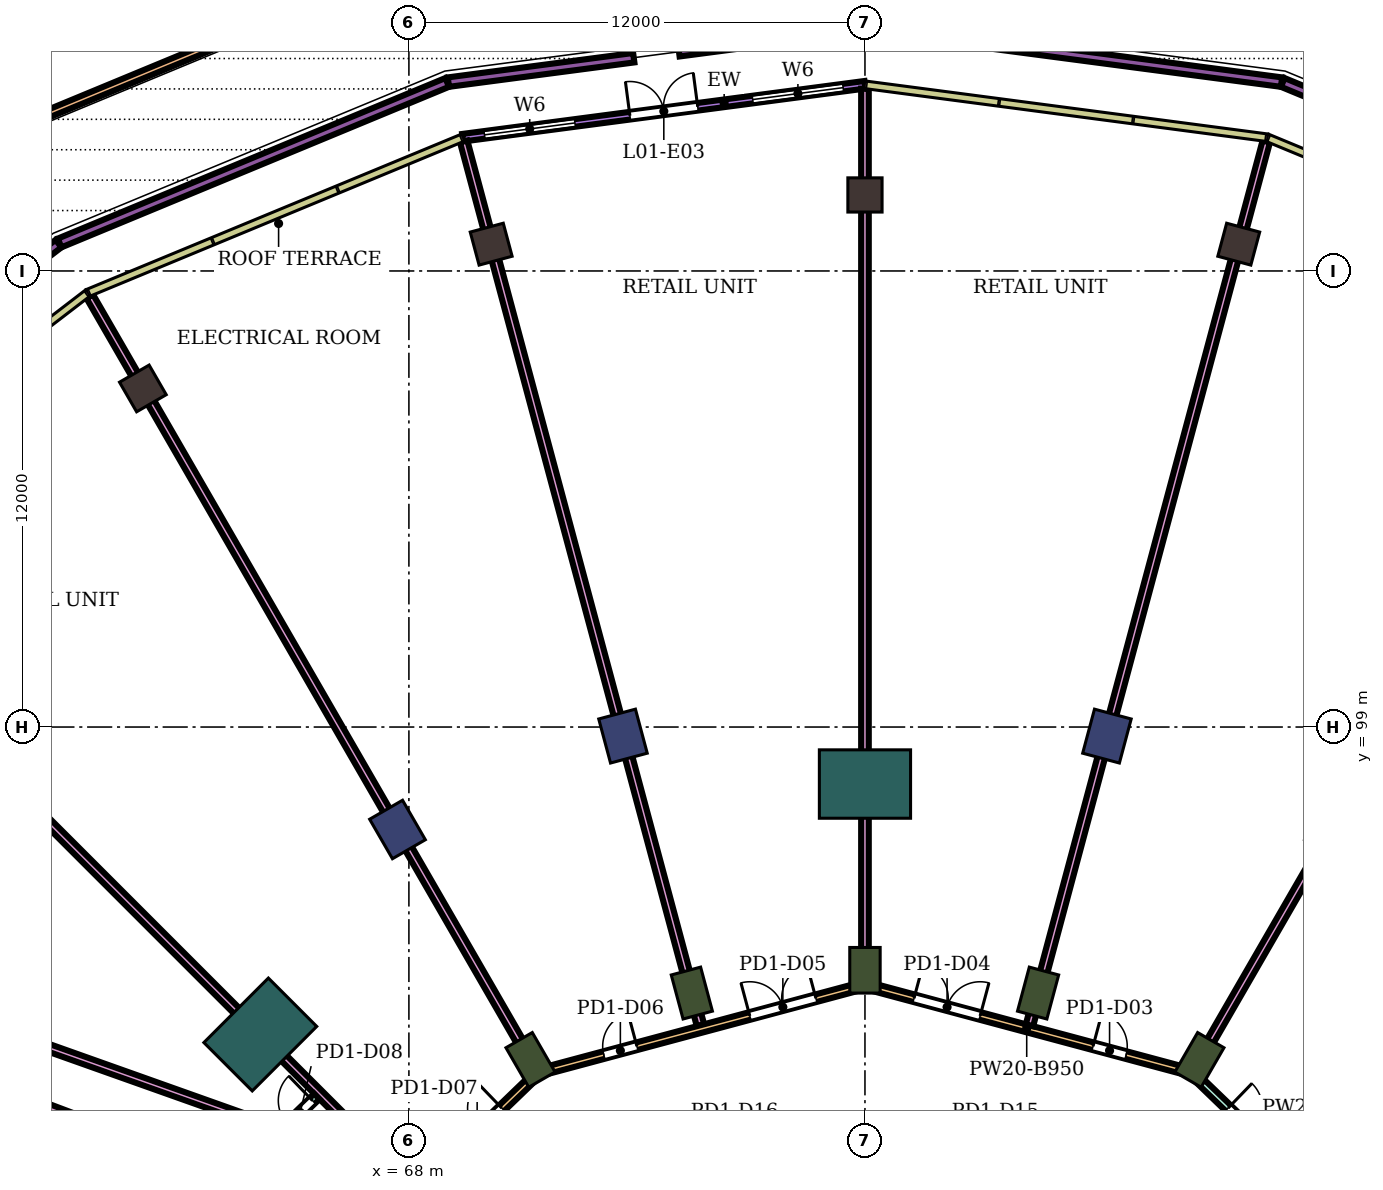
"""IFC4 building model, lengths in metres.
Left out: names, types, materials, properties, quantities, classifications, styles, units other than length and angle.
Written with IfcOpenShell. Run it as: python <this file> out.ifc"""

import sys

from ifc_helpers import new_model, si_unit, direction, frame, frame_2d, origin, origin_2d, place, context, subcontext, project, spatial, rectangle, extrude, element, fill, save


model = new_model("IFC4")
c1 = context("Model", 3, precision=1e-05, world=origin(), true_north=direction((0.0, 1.0)))
c2 = subcontext(c1, "Body", "Model", "MODEL_VIEW")
j1 = project(units=[si_unit("LENGTHUNIT", "METRE"), si_unit("PLANEANGLEUNIT", "RADIAN")], contexts=[c1])
p1 = place(None, origin())
s1 = spatial("IfcSite", under=j1, at=p1, CompositionType="ELEMENT")
p2 = place(p1, origin())
s2 = spatial("IfcBuilding", under=s1, at=p2, CompositionType="ELEMENT")
p3 = place(p2, frame((0.0, 0.0, 7.0)))
s3 = spatial("IfcBuildingStorey", under=s2, at=p3, CompositionType="ELEMENT", Elevation=7.0)
for number, where, z_axis, x_axis in (
    (1, (89.835, 111.705, 0.0), (0.0, 0.0, 1.0), (0.259, 0.966, 0.0)),
    (2, (80.0, 113.0, 0.0), (0.0, 0.0, 1.0), (0.0, 1.0, 0.0)),
    (3, (70.165, 111.705, 0.0), (0.0, 0.0, 1.0), (-0.259, 0.966, 0.0)),
    (4, (61.0, 107.909, 0.0), (0.0, 0.0, 1.0), (-0.5, 0.866, 0.0)),
):
    element("IfcColumn", number, at=place(p3, frame(where, z_axis=z_axis, x_axis=x_axis)), inside=s3, PredefinedType="COLUMN", context=c2, shape_type="SweptSolid", body=[
        extrude(rectangle(XDim=0.9, YDim=0.9, at=origin_2d()), origin(), (0.0, 0.0, 1.0), 5.4),
    ])
for number, where, z_axis, x_axis in (
    (5, (86.367, 98.762, 0.0), (0.0, 0.0, 1.0), (0.259, 0.966, 0.0)),
    (6, (73.633, 98.762, 0.0), (0.0, 0.0, 1.0), (-0.259, 0.966, 0.0)),
    (7, (67.7, 96.304, 0.0), (0.0, 0.0, 1.0), (-0.5, 0.866, 0.0)),
):
    element("IfcColumn", number, at=place(p3, frame(where, z_axis=z_axis, x_axis=x_axis)), inside=s3, PredefinedType="COLUMN", context=c2, shape_type="SweptSolid", body=[
        extrude(rectangle(XDim=1.2, YDim=1.0, at=origin_2d()), origin(), (0.0, 0.0, 1.0), 5.4),
    ])
for number, where, z_axis, x_axis in (
    (8, (88.8, 90.242, 0.0), (0.0, 0.0, 1.0), (0.5, 0.866, 0.0)),
    (9, (84.555, 92.0, 0.0), (0.0, 0.0, 1.0), (0.259, 0.966, 0.0)),
    (10, (80.0, 92.6, 0.0), (0.0, 0.0, 1.0), (0.0, 1.0, 0.0)),
    (11, (75.445, 92.0, 0.0), (0.0, 0.0, 1.0), (-0.259, 0.966, 0.0)),
    (12, (71.2, 90.242, 0.0), (0.0, 0.0, 1.0), (-0.5, 0.866, 0.0)),
):
    element("IfcColumn", number, at=place(p3, frame(where, z_axis=z_axis, x_axis=x_axis)), inside=s3, PredefinedType="COLUMN", context=c2, shape_type="SweptSolid", body=[
        extrude(rectangle(XDim=1.2, YDim=0.8, at=origin_2d()), origin(), (0.0, 0.0, 1.0), 5.4),
    ])
for number, where, z_axis, x_axis in (
    (13, (80.0, 97.5, 0.0), (0.0, 0.0, 1.0), (0.0, 1.0, 0.0)),
    (14, (64.09, 90.91, 0.0), (0.0, 0.0, 1.0), (-0.707, 0.707, 0.0)),
):
    element("IfcColumn", number, at=place(p3, frame(where, z_axis=z_axis, x_axis=x_axis)), inside=s3, PredefinedType="COLUMN", context=c2, shape_type="SweptSolid", body=[
        extrude(rectangle(XDim=1.8, YDim=2.4, at=origin_2d()), origin(), (0.0, 0.0, 1.0), 5.4),
    ])
p4 = place(p3, frame((80.0, 115.899, 0.0), z_axis=(0.0, 0.0, 1.0), x_axis=(-0.991445420614, -0.130521944298, 0.0)))
e15 = element("IfcWall", 15, at=p4, inside=s3, PredefinedType="NOTDEFINED", context=c2, shape_type="SweptSolid", body=[
    extrude(rectangle(XDim=10.677, YDim=0.2, at=frame_2d((5.338, 0.0))), origin(), (0.0, 0.0, 1.0), 5.4),
])
p5 = place(p4, frame((0.58, 0.0, 0.9)))
e16 = element("IfcOpeningElement", 16, at=p5, cuts=e15, PredefinedType="OPENING", context=c2, shape_type="SweptSolid", body=[
    extrude(rectangle(XDim=2.4, YDim=2.4, at=frame_2d((1.2, 1.2))), frame((0.0, 0.11, 0.0), z_axis=(0.0, -1.0, 0.0), x_axis=(1.0, 0.0, 0.0)), (0.0, 0.0, 1.0), 0.22),
])
p6 = place(p4, frame((4.438, 0.0, 0.0)))
e17 = element("IfcOpeningElement", 17, at=p6, cuts=e15, PredefinedType="OPENING", context=c2, shape_type="SweptSolid", body=[
    extrude(rectangle(XDim=1.8, YDim=2.4, at=frame_2d((0.9, 1.2))), frame((0.0, 0.11, 0.0), z_axis=(0.0, -1.0, 0.0), x_axis=(1.0, 0.0, 0.0)), (0.0, 0.0, 1.0), 0.22),
])
p7 = place(p4, frame((7.697, 0.0, 0.9)))
e18 = element("IfcOpeningElement", 18, at=p7, cuts=e15, PredefinedType="OPENING", context=c2, shape_type="SweptSolid", body=[
    extrude(rectangle(XDim=2.4, YDim=2.4, at=frame_2d((1.2, 1.2))), frame((0.0, 0.11, 0.0), z_axis=(0.0, -1.0, 0.0), x_axis=(1.0, 0.0, 0.0)), (0.0, 0.0, 1.0), 0.22),
])
p8 = place(p3, frame((57.164, 114.58, 0.0), z_axis=(0.0, 0.0, 1.0), x_axis=(0.923875337263, 0.382693560434, 0.0)))
e19 = element("IfcWall", 19, at=p8, inside=s3, PredefinedType="PARAPET", context=c2, shape_type="SweptSolid", body=[
    extrude(rectangle(XDim=11.903, YDim=0.2, at=frame_2d((5.951, 0.0))), origin(), (0.0, 0.0, 1.0), 1.1),
])
p9 = place(p3, frame((80.0, 117.412, 0.0), z_axis=(0.0, 0.0, 1.0), x_axis=(0.991443543519, -0.130536201932, 0.0)))
e20 = element("IfcWall", 20, at=p9, inside=s3, PredefinedType="USERDEFINED", context=c2, shape_type="SweptSolid", body=[
    extrude(rectangle(XDim=11.055, YDim=0.25, at=frame_2d((5.528, 0.0))), origin(), (0.0, 0.0, 1.0), 0.6),
])
p10 = place(p3, frame((90.992, 115.961, 0.0), z_axis=(0.0, 0.0, 1.0), x_axis=(0.923882326735, -0.382676686443, 0.0)))
e21 = element("IfcWall", 21, at=p10, inside=s3, PredefinedType="USERDEFINED", context=c2, shape_type="SweptSolid", body=[
    extrude(rectangle(XDim=11.039, YDim=0.25, at=frame_2d((5.52, 0.0))), origin(), (0.0, 0.0, 1.0), 0.6),
])
p11 = place(p3, frame((50.017, 104.995, 0.0), z_axis=(0.0, 0.0, 1.0), x_axis=(0.793356238532, 0.608757651929, 0.0)))
e22 = element("IfcWall", 22, at=p11, inside=s3, PredefinedType="USERDEFINED", context=c2, shape_type="SweptSolid", body=[
    extrude(rectangle(XDim=11.047, YDim=0.25, at=frame_2d((5.524, 0.0))), origin(), (0.0, 0.0, 1.0), 0.6),
])
p12 = place(p3, frame((58.809, 111.736, 0.0), z_axis=(0.0, 0.0, 1.0), x_axis=(0.923882326735, 0.382676686443, 0.0)))
e23 = element("IfcWall", 23, at=p12, inside=s3, PredefinedType="USERDEFINED", context=c2, shape_type="SweptSolid", body=[
    extrude(rectangle(XDim=11.039, YDim=0.25, at=frame_2d((5.52, 0.0))), origin(), (0.0, 0.0, 1.0), 0.6),
])
p13 = place(p3, frame((69.039, 115.969, 0.0), z_axis=(0.0, 0.0, 1.0), x_axis=(0.991445002311, 0.130525121694, 0.0)))
e24 = element("IfcWall", 24, at=p13, inside=s3, PredefinedType="USERDEFINED", context=c2, shape_type="SweptSolid", body=[
    extrude(rectangle(XDim=4.919, YDim=0.25, at=frame_2d((2.459, 0.0))), origin(), (0.0, 0.0, 1.0), 0.6),
])
p14 = place(p3, frame((75.106, 116.768, 0.0), z_axis=(0.0, 0.0, 1.0), x_axis=(0.991443854217, 0.130533842111, 0.0)))
e25 = element("IfcWall", 25, at=p14, inside=s3, PredefinedType="USERDEFINED", context=c2, shape_type="SweptSolid", body=[
    extrude(rectangle(XDim=4.936, YDim=0.25, at=frame_2d((2.468, 0.0))), origin(), (0.0, 0.0, 1.0), 0.6),
])
p15 = place(p3, frame((43.308, 92.114, 0.0), z_axis=(0.0, 0.0, 1.0), x_axis=(0.919685506152, -0.39265579045, 0.0)))
e26 = element("IfcWall", 26, at=p15, inside=s3, PredefinedType="PARTITIONING", context=c2, shape_type="SweptSolid", body=[
    extrude(rectangle(XDim=18.848, YDim=0.2, at=frame_2d((9.424, 0.0))), origin(), (0.0, 0.0, 1.0), 4.95),
])
p16 = place(p3, frame((43.775, 93.243, 0.0), z_axis=(0.0, 0.0, 1.0), x_axis=(0.928161429734, -0.372177861181, 0.0)))
e27 = element("IfcWall", 27, at=p16, inside=s3, PredefinedType="PARTITIONING", context=c2, shape_type="SweptSolid", body=[
    extrude(rectangle(XDim=19.568, YDim=0.2, at=frame_2d((9.784, 0.0))), origin(), (0.0, 0.0, 1.0), 3.35),
])
p17 = place(p3, frame((44.238, 94.363, 0.0), z_axis=(0.0, 0.0, 1.0), x_axis=(0.935745518328, -0.352675948896, 0.0)))
e28 = element("IfcWall", 28, at=p17, inside=s3, PredefinedType="PARTITIONING", context=c2, shape_type="SweptSolid", body=[
    extrude(rectangle(XDim=20.295, YDim=0.2, at=frame_2d((10.147, 0.0))), origin(), (0.0, 0.0, 1.0), 3.35),
])
p18 = place(p3, frame((44.719, 95.463, 0.0), z_axis=(0.0, 0.0, 1.0), x_axis=(0.94231036805, -0.33474045209, 0.0)))
e29 = element("IfcWall", 29, at=p18, inside=s3, PredefinedType="PARTITIONING", context=c2, shape_type="SweptSolid", body=[
    extrude(rectangle(XDim=20.987, YDim=0.2, at=frame_2d((10.493, 0.0))), origin(), (0.0, 0.0, 1.0), 3.35),
])
p19 = place(p3, frame((51.152, 103.848, 0.0), z_axis=(0.0, 0.0, 1.0), x_axis=(0.707106781187, -0.707106781187, 0.0)))
e30 = element("IfcWall", 30, at=p19, inside=s3, PredefinedType="PARTITIONING", context=c2, shape_type="SweptSolid", body=[
    extrude(rectangle(XDim=23.993, YDim=0.2, at=frame_2d((11.997, 0.0))), origin(), (0.0, 0.0, 1.0), 3.35),
])
p20 = place(p3, frame((59.48, 83.4, 0.0), z_axis=(0.0, 0.0, 1.0), x_axis=(0.71978771682, 0.694194239903, 0.0)))
e31 = element("IfcWall", 31, at=p20, inside=s3, PredefinedType="PARTITIONING", context=c2, shape_type="SweptSolid", body=[
    extrude(rectangle(XDim=8.471, YDim=0.2, at=frame_2d((4.235, 0.0))), origin(), (0.0, 0.0, 1.0), 4.95),
])
p21 = place(p20, frame((7.413, 0.0, 0.0)))
e32 = element("IfcOpeningElement", 32, at=p21, cuts=e31, PredefinedType="OPENING", context=c2, shape_type="SweptSolid", body=[
    extrude(rectangle(XDim=0.9, YDim=2.1, at=frame_2d((0.45, 1.05))), frame((0.0, 0.11, 0.0), z_axis=(0.0, -1.0, 0.0), x_axis=(1.0, 0.0, 0.0)), (0.0, 0.0, 1.0), 0.22),
])
p22 = place(p20, frame((5.84, 0.0, 0.0)))
e33 = element("IfcOpeningElement", 33, at=p22, cuts=e31, PredefinedType="OPENING", context=c2, shape_type="SweptSolid", body=[
    extrude(rectangle(XDim=0.9, YDim=2.1, at=frame_2d((0.45, 1.05))), frame((0.0, 0.11, 0.0), z_axis=(0.0, -1.0, 0.0), x_axis=(1.0, 0.0, 0.0)), (0.0, 0.0, 1.0), 0.22),
])
p23 = place(p20, frame((4.055, 0.0, 0.0)))
e34 = element("IfcOpeningElement", 34, at=p23, cuts=e31, PredefinedType="OPENING", context=c2, shape_type="SweptSolid", body=[
    extrude(rectangle(XDim=0.9, YDim=2.1, at=frame_2d((0.45, 1.05))), frame((0.0, 0.11, 0.0), z_axis=(0.0, -1.0, 0.0), x_axis=(1.0, 0.0, 0.0)), (0.0, 0.0, 1.0), 0.22),
])
p24 = place(p20, frame((2.256, 0.0, 0.0)))
e35 = element("IfcOpeningElement", 35, at=p24, cuts=e31, PredefinedType="OPENING", context=c2, shape_type="SweptSolid", body=[
    extrude(rectangle(XDim=0.9, YDim=2.1, at=frame_2d((0.45, 1.05))), frame((0.0, 0.11, 0.0), z_axis=(0.0, -1.0, 0.0), x_axis=(1.0, 0.0, 0.0)), (0.0, 0.0, 1.0), 0.22),
])
p25 = place(p20, frame((0.251, 0.0, 0.0)))
e36 = element("IfcOpeningElement", 36, at=p25, cuts=e31, PredefinedType="OPENING", context=c2, shape_type="SweptSolid", body=[
    extrude(rectangle(XDim=0.9, YDim=2.1, at=frame_2d((0.45, 1.05))), frame((0.0, 0.11, 0.0), z_axis=(0.0, -1.0, 0.0), x_axis=(1.0, 0.0, 0.0)), (0.0, 0.0, 1.0), 0.22),
])
p26 = place(p3, frame((59.601, 110.333, 0.0), z_axis=(0.0, 0.0, 1.0), x_axis=(0.499979991004, -0.866036955676, 0.0)))
e37 = element("IfcWall", 37, at=p26, inside=s3, PredefinedType="PARTITIONING", context=c2, shape_type="SweptSolid", body=[
    extrude(rectangle(XDim=23.497, YDim=0.2, at=frame_2d((11.748, 0.0))), origin(), (0.0, 0.0, 1.0), 3.35),
])
p27 = place(p3, frame((66.22, 84.9, 0.0), z_axis=(0.0, 0.0, 1.0), x_axis=(0.719621348931, 0.694366700068, 0.0)))
e38 = element("IfcWall", 38, at=p27, inside=s3, PredefinedType="PARTITIONING", context=c2, shape_type="SweptSolid", body=[
    extrude(rectangle(XDim=7.173, YDim=0.2, at=frame_2d((3.586, 0.0))), origin(), (0.0, 0.0, 1.0), 4.45),
])
p28 = place(p27, frame((4.069, 0.0, 0.0)))
e39 = element("IfcOpeningElement", 39, at=p28, cuts=e38, PredefinedType="OPENING", context=c2, shape_type="SweptSolid", body=[
    extrude(rectangle(XDim=1.8, YDim=2.1, at=frame_2d((0.9, 1.05))), frame((0.0, 0.11, 0.0), z_axis=(0.0, -1.0, 0.0), x_axis=(1.0, 0.0, 0.0)), (0.0, 0.0, 1.0), 0.22),
])
p29 = place(p27, frame((0.932, 0.0, 0.0)))
e40 = element("IfcOpeningElement", 40, at=p29, cuts=e38, PredefinedType="OPENING", context=c2, shape_type="SweptSolid", body=[
    extrude(rectangle(XDim=0.9, YDim=2.1, at=frame_2d((0.45, 1.05))), frame((0.0, 0.11, 0.0), z_axis=(0.0, -1.0, 0.0), x_axis=(1.0, 0.0, 0.0)), (0.0, 0.0, 1.0), 0.22),
])
p30 = place(p3, frame((69.441, 114.407, 0.0), z_axis=(0.0, 0.0, 1.0), x_axis=(0.25880367254, -0.965929945224, 0.0)))
e41 = element("IfcWall", 41, at=p30, inside=s3, PredefinedType="PARTITIONING", context=c2, shape_type="SweptSolid", body=[
    extrude(rectangle(XDim=24.074, YDim=0.2, at=frame_2d((12.037, 0.0))), origin(), (0.0, 0.0, 1.0), 3.35),
])
p31 = place(p3, frame((71.411, 89.908, 0.0), z_axis=(0.0, 0.0, 1.0), x_axis=(0.965907314361, 0.258888122678, 0.0)))
e42 = element("IfcWall", 42, at=p31, inside=s3, PredefinedType="PARTITIONING", context=c2, shape_type="SweptSolid", body=[
    extrude(rectangle(XDim=8.802, YDim=0.2, at=frame_2d((4.401, 0.0))), origin(), (0.0, 0.0, 1.0), 4.45),
])
p32 = place(p31, frame((5.755, 0.0, 0.0)))
e43 = element("IfcOpeningElement", 43, at=p32, cuts=e42, PredefinedType="OPENING", context=c2, shape_type="SweptSolid", body=[
    extrude(rectangle(XDim=1.8, YDim=2.1, at=frame_2d((0.9, 1.05))), frame((0.0, 0.11, 0.0), z_axis=(0.0, -1.0, 0.0), x_axis=(1.0, 0.0, 0.0)), (0.0, 0.0, 1.0), 0.22),
])
p33 = place(p31, frame((1.779, 0.0, 0.0)))
e44 = element("IfcOpeningElement", 44, at=p33, cuts=e42, PredefinedType="OPENING", context=c2, shape_type="SweptSolid", body=[
    extrude(rectangle(XDim=0.9, YDim=2.1, at=frame_2d((0.45, 1.05))), frame((0.0, 0.11, 0.0), z_axis=(0.0, -1.0, 0.0), x_axis=(1.0, 0.0, 0.0)), (0.0, 0.0, 1.0), 0.22),
])
p34 = place(p3, frame((80.0, 92.3, 0.0), z_axis=(0.0, 0.0, 1.0), x_axis=(0.0, 1.0, 0.0)))
e45 = element("IfcWall", 45, at=p34, inside=s3, PredefinedType="PARTITIONING", context=c2, shape_type="SweptSolid", body=[
    extrude(rectangle(XDim=23.498, YDim=0.2, at=frame_2d((11.749, 0.0))), origin(), (0.0, 0.0, 1.0), 3.35),
])
p35 = place(p3, frame((80.0, 92.21, 0.0), z_axis=(0.0, 0.0, 1.0), x_axis=(0.965910452724, -0.258876413213, 0.0)))
e46 = element("IfcWall", 46, at=p35, inside=s3, PredefinedType="PARTITIONING", context=c2, shape_type="SweptSolid", body=[
    extrude(rectangle(XDim=8.812, YDim=0.2, at=frame_2d((4.406, 0.0))), origin(), (0.0, 0.0, 1.0), 4.45),
])
p36 = place(p35, frame((6.213, 0.0, 0.0)))
e47 = element("IfcOpeningElement", 47, at=p36, cuts=e46, PredefinedType="OPENING", context=c2, shape_type="SweptSolid", body=[
    extrude(rectangle(XDim=0.9, YDim=2.1, at=frame_2d((0.45, 1.05))), frame((0.0, 0.11, 0.0), z_axis=(0.0, -1.0, 0.0), x_axis=(1.0, 0.0, 0.0)), (0.0, 0.0, 1.0), 0.22),
])
p37 = place(p35, frame((1.337, 0.0, 0.0)))
e48 = element("IfcOpeningElement", 48, at=p37, cuts=e46, PredefinedType="OPENING", context=c2, shape_type="SweptSolid", body=[
    extrude(rectangle(XDim=1.8, YDim=2.1, at=frame_2d((0.9, 1.05))), frame((0.0, 0.11, 0.0), z_axis=(0.0, -1.0, 0.0), x_axis=(1.0, 0.0, 0.0)), (0.0, 0.0, 1.0), 0.22),
])
p38 = place(p3, frame((84.329, 91.153, 0.0), z_axis=(0.0, 0.0, 1.0), x_axis=(0.258825131653, 0.965924195382, 0.0)))
e49 = element("IfcWall", 49, at=p38, inside=s3, PredefinedType="PARTITIONING", context=c2, shape_type="SweptSolid", body=[
    extrude(rectangle(XDim=24.074, YDim=0.2, at=frame_2d((12.037, 0.0))), origin(), (0.0, 0.0, 1.0), 3.35),
])
p39 = place(p3, frame((88.668, 89.832, 0.0), z_axis=(0.0, 0.0, 1.0), x_axis=(0.71956091863, -0.694429322811, 0.0)))
e50 = element("IfcWall", 50, at=p39, inside=s3, PredefinedType="PARTITIONING", context=c2, shape_type="SweptSolid", body=[
    extrude(rectangle(XDim=7.043, YDim=0.2, at=frame_2d((3.521, 0.0))), origin(), (0.0, 0.0, 1.0), 4.95),
])
p40 = place(p39, frame((4.821, 0.0, 0.0)))
e51 = element("IfcOpeningElement", 51, at=p40, cuts=e50, PredefinedType="OPENING", context=c2, shape_type="SweptSolid", body=[
    extrude(rectangle(XDim=1.8, YDim=2.1, at=frame_2d((0.9, 1.05))), frame((0.0, 0.11, 0.0), z_axis=(0.0, -1.0, 0.0), x_axis=(1.0, 0.0, 0.0)), (0.0, 0.0, 1.0), 0.22),
])
p41 = place(p39, frame((1.234, 0.0, 0.0)))
e52 = element("IfcOpeningElement", 52, at=p41, cuts=e50, PredefinedType="OPENING", context=c2, shape_type="SweptSolid", body=[
    extrude(rectangle(XDim=1.8, YDim=2.1, at=frame_2d((0.9, 1.05))), frame((0.0, 0.11, 0.0), z_axis=(0.0, -1.0, 0.0), x_axis=(1.0, 0.0, 0.0)), (0.0, 0.0, 1.0), 0.22),
])
p42 = place(p3, frame((88.602, 89.896, 0.0), z_axis=(0.0, 0.0, 1.0), x_axis=(0.500044870432, 0.865999496279, 0.0)))
e53 = element("IfcWall", 53, at=p42, inside=s3, PredefinedType="PARTITIONING", context=c2, shape_type="SweptSolid", body=[
    extrude(rectangle(XDim=23.596, YDim=0.2, at=frame_2d((11.798, 0.0))), origin(), (0.0, 0.0, 1.0), 3.35),
])
p43 = place(p5, origin())
e54 = element("IfcWindow", 54, at=p43, inside=s3, PartitioningType="SINGLE_PANEL", PredefinedType="WINDOW", context=c2, shape_type="SweptSolid", body=[
    extrude(rectangle(XDim=2.4, YDim=2.4, at=frame_2d((1.2, 1.2))), frame((0.0, 0.03, 0.0), z_axis=(0.0, -1.0, 0.0), x_axis=(1.0, 0.0, 0.0)), (0.0, 0.0, 1.0), 0.06),
])
fill(e16, e54)
p44 = place(p6, frame((1.8, 0.0, 0.0), z_axis=(0.0, 0.0, 1.0), x_axis=(-1.0, 0.0, 0.0)))
e55 = element("IfcDoor", 55, at=p44, inside=s3, OperationType="DOUBLE_DOOR_SINGLE_SWING", PredefinedType="DOOR", context=c2, shape_type="SweptSolid", body=[
    extrude(rectangle(XDim=1.8, YDim=2.4, at=frame_2d((0.9, 1.2))), frame((0.0, 0.025, 0.0), z_axis=(0.0, -1.0, 0.0), x_axis=(1.0, 0.0, 0.0)), (0.0, 0.0, 1.0), 0.05),
])
fill(e17, e55)
p45 = place(p7, origin())
e56 = element("IfcWindow", 56, at=p45, inside=s3, PartitioningType="SINGLE_PANEL", PredefinedType="WINDOW", context=c2, shape_type="SweptSolid", body=[
    extrude(rectangle(XDim=2.4, YDim=2.4, at=frame_2d((1.2, 1.2))), frame((0.0, 0.03, 0.0), z_axis=(0.0, -1.0, 0.0), x_axis=(1.0, 0.0, 0.0)), (0.0, 0.0, 1.0), 0.06),
])
fill(e18, e56)
p46 = place(p41, origin())
e57 = element("IfcDoor", 57, at=p46, inside=s3, OperationType="DOUBLE_DOOR_SINGLE_SWING", PredefinedType="DOOR", context=c2, shape_type="SweptSolid", body=[
    extrude(rectangle(XDim=1.8, YDim=2.1, at=frame_2d((0.9, 1.05))), frame((0.0, 0.025, 0.0), z_axis=(0.0, -1.0, 0.0), x_axis=(1.0, 0.0, 0.0)), (0.0, 0.0, 1.0), 0.05),
])
fill(e52, e57)
p47 = place(p36, origin())
e58 = element("IfcDoor", 58, at=p47, inside=s3, OperationType="SINGLE_SWING_LEFT", PredefinedType="DOOR", context=c2, shape_type="SweptSolid", body=[
    extrude(rectangle(XDim=0.9, YDim=2.1, at=frame_2d((0.45, 1.05))), frame((0.0, 0.025, 0.0), z_axis=(0.0, -1.0, 0.0), x_axis=(1.0, 0.0, 0.0)), (0.0, 0.0, 1.0), 0.05),
])
fill(e47, e58)
p48 = place(p37, origin())
e59 = element("IfcDoor", 59, at=p48, inside=s3, OperationType="DOUBLE_DOOR_SINGLE_SWING", PredefinedType="DOOR", context=c2, shape_type="SweptSolid", body=[
    extrude(rectangle(XDim=1.8, YDim=2.1, at=frame_2d((0.9, 1.05))), frame((0.0, 0.025, 0.0), z_axis=(0.0, -1.0, 0.0), x_axis=(1.0, 0.0, 0.0)), (0.0, 0.0, 1.0), 0.05),
])
fill(e48, e59)
p49 = place(p32, origin())
e60 = element("IfcDoor", 60, at=p49, inside=s3, OperationType="DOUBLE_DOOR_SINGLE_SWING", PredefinedType="DOOR", context=c2, shape_type="SweptSolid", body=[
    extrude(rectangle(XDim=1.8, YDim=2.1, at=frame_2d((0.9, 1.05))), frame((0.0, 0.025, 0.0), z_axis=(0.0, -1.0, 0.0), x_axis=(1.0, 0.0, 0.0)), (0.0, 0.0, 1.0), 0.05),
])
fill(e43, e60)
p50 = place(p33, origin())
e61 = element("IfcDoor", 61, at=p50, inside=s3, OperationType="SINGLE_SWING_RIGHT", PredefinedType="DOOR", context=c2, shape_type="SweptSolid", body=[
    extrude(rectangle(XDim=0.9, YDim=2.1, at=frame_2d((0.45, 1.05))), frame((0.0, 0.025, 0.0), z_axis=(0.0, -1.0, 0.0), x_axis=(1.0, 0.0, 0.0)), (0.0, 0.0, 1.0), 0.05),
])
fill(e44, e61)
p51 = place(p28, origin())
e62 = element("IfcDoor", 62, at=p51, inside=s3, OperationType="DOUBLE_DOOR_SINGLE_SWING", PredefinedType="DOOR", context=c2, shape_type="SweptSolid", body=[
    extrude(rectangle(XDim=1.8, YDim=2.1, at=frame_2d((0.9, 1.05))), frame((0.0, 0.025, 0.0), z_axis=(0.0, -1.0, 0.0), x_axis=(1.0, 0.0, 0.0)), (0.0, 0.0, 1.0), 0.05),
])
fill(e39, e62)
p52 = place(p21, origin())
e63 = element("IfcDoor", 63, at=p52, inside=s3, OperationType="SINGLE_SWING_RIGHT", PredefinedType="DOOR", context=c2, shape_type="SweptSolid", body=[
    extrude(rectangle(XDim=0.9, YDim=2.1, at=frame_2d((0.45, 1.05))), frame((0.0, 0.025, 0.0), z_axis=(0.0, -1.0, 0.0), x_axis=(1.0, 0.0, 0.0)), (0.0, 0.0, 1.0), 0.05),
])
fill(e32, e63)
save(model, sys.argv[1])
